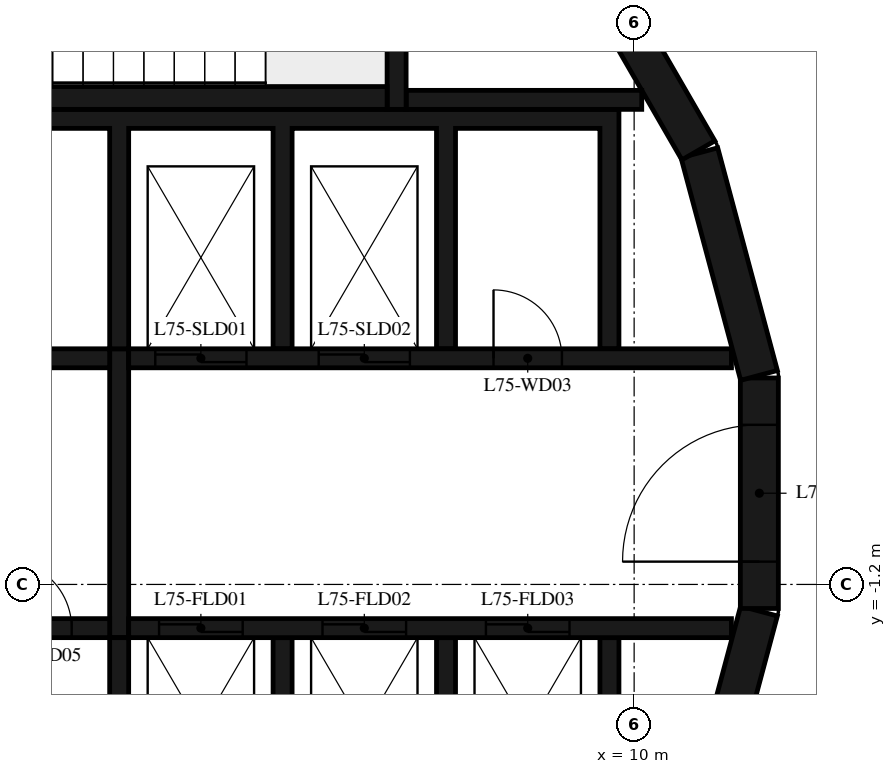
"""IFC4 building model, lengths in metres.
Left out: names, types, materials, properties, quantities, classifications, styles, units other than length and angle.
Written with IfcOpenShell. Run it as: python <this file> out.ifc"""

import sys

from ifc_helpers import new_model, si_unit, direction, frame, frame_2d, origin, place, context, subcontext, project, spatial, polyline, rectangle, outline, extrude, element, fill, save


model = new_model("IFC4")
c1 = context("Model", 3, precision=1e-05, world=origin(), true_north=direction((0.0, 1.0)))
c2 = subcontext(c1, "Body", "Model", "MODEL_VIEW")
j1 = project(units=[si_unit("LENGTHUNIT", "METRE"), si_unit("PLANEANGLEUNIT", "RADIAN")], contexts=[c1])
p1 = place(None, origin())
s1 = spatial("IfcSite", under=j1, at=p1, CompositionType="ELEMENT")
p2 = place(p1, origin())
s2 = spatial("IfcBuilding", under=s1, at=p2, CompositionType="ELEMENT")
p3 = place(p2, frame((0.0, 0.0, 291.4)))
s3 = spatial("IfcBuildingStorey", under=s2, at=p3, CompositionType="ELEMENT", Elevation=291.4)
p4 = place(p3, frame((10.858, -4.479, 0.0), z_axis=(0.0, 0.0, 1.0), x_axis=(0.258734743916, 0.965948410781, 0.0)))
e1 = element("IfcWall", 1, at=p4, inside=s3, PredefinedType="SHEAR", context=c2, shape_type="SweptSolid", body=[
    extrude(rectangle(XDim=3.033, YDim=0.5, at=frame_2d((1.516, 0.0))), origin(), (0.0, 0.0, 1.0), 6.35),
])
p5 = place(p3, frame((11.647, -1.516, 0.0), z_axis=(0.0, 0.0, 1.0), x_axis=(0.0, 1.0, 0.0)))
e2 = element("IfcWall", 2, at=p5, inside=s3, PredefinedType="SHEAR", context=c2, shape_type="SweptSolid", body=[
    extrude(rectangle(XDim=3.033, YDim=0.5, at=frame_2d((1.516, 0.0))), origin(), (0.0, 0.0, 1.0), 6.35),
])
p6 = place(p5, frame((0.616, 0.0, 0.0)))
e3 = element("IfcOpeningElement", 3, at=p6, cuts=e2, PredefinedType="OPENING", context=c2, shape_type="SweptSolid", body=[
    extrude(rectangle(XDim=1.8, YDim=2.1, at=frame_2d((0.9, 1.05))), frame((0.0, 0.26, 0.0), z_axis=(0.0, -1.0, 0.0), x_axis=(1.0, 0.0, 0.0)), (0.0, 0.0, 1.0), 0.52),
])
for number, where, z_axis, x_axis in (
    (4, (11.643, 1.55, 0.0), (0.0, 0.0, 1.0), (-0.259, 0.966, 0.0)),
    (5, (10.845, 4.51, 0.0), (0.0, 0.0, 1.0), (-0.5, 0.866, 0.0)),
):
    element("IfcWall", number, at=place(p3, frame(where, z_axis=z_axis, x_axis=x_axis)), inside=s3, PredefinedType="SHEAR", context=c2, shape_type="SweptSolid", body=[
        extrude(rectangle(XDim=3.033, YDim=0.5, at=frame_2d((1.516, 0.0))), origin(), (0.0, 0.0, 1.0), 6.35),
    ])
p7 = place(p3, frame((0.0, 5.2, 0.0), z_axis=(0.0, 0.0, 1.0), x_axis=(1.0, 0.0, 0.0)))
e6 = element("IfcWall", 6, at=p7, inside=s3, PredefinedType="SHEAR", context=c2, shape_type="SweptSolid", body=[
    extrude(rectangle(XDim=6.75, YDim=0.3, at=frame_2d((3.375, 0.0))), origin(), (0.0, 0.0, 1.0), 6.35),
])
p8 = place(p3, frame((6.875, 5.05, 0.0), z_axis=(0.0, 0.0, 1.0), x_axis=(0.0, 1.0, 0.0)))
e7 = element("IfcWall", 7, at=p8, inside=s3, PredefinedType="SHEAR", context=c2, shape_type="SweptSolid", body=[
    extrude(rectangle(XDim=3.92, YDim=0.25, at=frame_2d((1.96, 0.0))), origin(), (0.0, 0.0, 1.0), 6.35),
])
p9 = place(p8, frame((1.11, 0.0, 0.0)))
e8 = element("IfcOpeningElement", 8, at=p9, cuts=e7, PredefinedType="OPENING", context=c2, shape_type="SweptSolid", body=[
    extrude(rectangle(XDim=1.2, YDim=2.1, at=frame_2d((0.6, 1.05))), frame((0.0, 0.135, 0.0), z_axis=(0.0, -1.0, 0.0), x_axis=(1.0, 0.0, 0.0)), (0.0, 0.0, 1.0), 0.27),
])
p10 = place(p3, frame((7.0, 5.175, 0.0), z_axis=(0.0, 0.0, 1.0), x_axis=(1.0, 0.0, 0.0)))
e9 = element("IfcWall", 9, at=p10, inside=s3, PredefinedType="SHEAR", context=c2, shape_type="SweptSolid", body=[
    extrude(rectangle(XDim=3.1, YDim=0.25, at=frame_2d((1.55, 0.0))), origin(), (0.0, 0.0, 1.0), 6.35),
])
p11 = place(p3, origin())
e10 = element("IfcWall", 10, at=p11, inside=s3, PredefinedType="SHEAR", context=c2, shape_type="SweptSolid", body=[
    extrude(outline(polyline([(-9.8, 1.9), (-9.55, 1.9), (-9.55, 4.8), (-3.35, 4.8), (-3.35, 1.9), (-3.1, 1.9), (-3.1, 4.8), (3.1, 4.8), (3.1, 1.9), (3.35, 1.9), (3.35, 4.8), (5.25, 4.8), (5.25, 1.9), (5.5, 1.9), (5.5, 4.8), (7.4, 4.8), (7.4, 1.9), (7.65, 1.9), (7.65, 4.8), (9.55, 4.8), (9.55, 1.9), (9.8, 1.9), (9.8, 4.8), (9.8, 5.05), (-9.8, 5.05), (-9.8, 4.8), (-9.8, 1.9)])), origin(), (0.0, 0.0, 1.0), 6.35),
])
p12 = place(p3, origin())
e11 = element("IfcWall", 11, at=p12, inside=s3, PredefinedType="SHEAR", context=c2, shape_type="SweptSolid", body=[
    extrude(outline(polyline([(9.8, -5.05), (9.8, -4.8), (9.8, -1.9), (9.55, -1.9), (9.55, -4.8), (7.65, -4.8), (7.65, -1.9), (7.4, -1.9), (7.4, -4.8), (5.5, -4.8), (5.5, -1.9), (5.25, -1.9), (5.25, -4.8), (3.35, -4.8), (3.35, -1.9), (3.1, -1.9), (3.1, -4.8), (1.2, -4.8), (1.2, -1.9), (0.95, -1.9), (0.95, -4.8), (-0.95, -4.8), (-0.95, -1.9), (-1.2, -1.9), (-1.2, -4.8), (-3.1, -4.8), (-3.1, -1.9), (-3.35, -1.9), (-3.35, -4.8), (-5.25, -4.8), (-5.25, -1.9), (-5.5, -1.9), (-5.5, -4.8), (-9.55, -4.8), (-9.55, -1.9), (-9.8, -1.9), (-9.8, -4.8), (-9.8, -5.05), (9.8, -5.05)])), origin(), (0.0, 0.0, 1.0), 6.35),
])
p13 = place(p3, frame((-11.28, 1.775, 0.0), z_axis=(0.0, 0.0, 1.0), x_axis=(1.0, 0.0, 0.0)))
e12 = element("IfcWall", 12, at=p13, inside=s3, PredefinedType="SHEAR", context=c2, shape_type="SweptSolid", body=[
    extrude(rectangle(XDim=14.38, YDim=0.25, at=frame_2d((7.19, 0.0))), origin(), (0.0, 0.0, 1.0), 6.35),
])
p14 = place(p13, frame((4.38, 0.0, 0.0)))
e13 = element("IfcOpeningElement", 13, at=p14, cuts=e12, PredefinedType="OPENING", context=c2, shape_type="SweptSolid", body=[
    extrude(rectangle(XDim=0.9, YDim=2.1, at=frame_2d((0.45, 1.05))), frame((0.0, 0.135, 0.0), z_axis=(0.0, -1.0, 0.0), x_axis=(1.0, 0.0, 0.0)), (0.0, 0.0, 1.0), 0.27),
])
p15 = place(p13, frame((10.83, 0.0, 0.0)))
e14 = element("IfcOpeningElement", 14, at=p15, cuts=e12, PredefinedType="OPENING", context=c2, shape_type="SweptSolid", body=[
    extrude(rectangle(XDim=0.9, YDim=2.1, at=frame_2d((0.45, 1.05))), frame((0.0, 0.135, 0.0), z_axis=(0.0, -1.0, 0.0), x_axis=(1.0, 0.0, 0.0)), (0.0, 0.0, 1.0), 0.27),
])
p16 = place(p3, frame((3.35, 1.775, 0.0), z_axis=(0.0, 0.0, 1.0), x_axis=(1.0, 0.0, 0.0)))
e15 = element("IfcWall", 15, at=p16, inside=s3, PredefinedType="SHEAR", context=c2, shape_type="SweptSolid", body=[
    extrude(rectangle(XDim=7.93, YDim=0.25, at=frame_2d((3.965, 0.0))), origin(), (0.0, 0.0, 1.0), 6.35),
])
p17 = place(p16, frame((0.35, 0.0, 0.0)))
e16 = element("IfcOpeningElement", 16, at=p17, cuts=e15, PredefinedType="OPENING", context=c2, shape_type="SweptSolid", body=[
    extrude(rectangle(XDim=1.2, YDim=2.4, at=frame_2d((0.6, 1.2))), frame((0.0, 0.135, 0.0), z_axis=(0.0, -1.0, 0.0), x_axis=(1.0, 0.0, 0.0)), (0.0, 0.0, 1.0), 0.27),
])
p18 = place(p16, frame((2.5, 0.0, 0.0)))
e17 = element("IfcOpeningElement", 17, at=p18, cuts=e15, PredefinedType="OPENING", context=c2, shape_type="SweptSolid", body=[
    extrude(rectangle(XDim=1.2, YDim=2.4, at=frame_2d((0.6, 1.2))), frame((0.0, 0.135, 0.0), z_axis=(0.0, -1.0, 0.0), x_axis=(1.0, 0.0, 0.0)), (0.0, 0.0, 1.0), 0.27),
])
p19 = place(p16, frame((4.8, 0.0, 0.0)))
e18 = element("IfcOpeningElement", 18, at=p19, cuts=e15, PredefinedType="OPENING", context=c2, shape_type="SweptSolid", body=[
    extrude(rectangle(XDim=0.9, YDim=2.1, at=frame_2d((0.45, 1.05))), frame((0.0, 0.135, 0.0), z_axis=(0.0, -1.0, 0.0), x_axis=(1.0, 0.0, 0.0)), (0.0, 0.0, 1.0), 0.27),
])
p20 = place(p3, frame((-11.28, -1.775, 0.0), z_axis=(0.0, 0.0, 1.0), x_axis=(1.0, 0.0, 0.0)))
e19 = element("IfcWall", 19, at=p20, inside=s3, PredefinedType="SHEAR", context=c2, shape_type="SweptSolid", body=[
    extrude(rectangle(XDim=14.38, YDim=0.25, at=frame_2d((7.19, 0.0))), origin(), (0.0, 0.0, 1.0), 6.35),
])
p21 = place(p20, frame((6.43, 0.0, 0.0)))
e20 = element("IfcOpeningElement", 20, at=p21, cuts=e19, PredefinedType="OPENING", context=c2, shape_type="SweptSolid", body=[
    extrude(rectangle(XDim=1.1, YDim=2.1, at=frame_2d((0.55, 1.05))), frame((0.0, 0.135, 0.0), z_axis=(0.0, -1.0, 0.0), x_axis=(1.0, 0.0, 0.0)), (0.0, 0.0, 1.0), 0.27),
])
p22 = place(p20, frame((8.58, 0.0, 0.0)))
e21 = element("IfcOpeningElement", 21, at=p22, cuts=e19, PredefinedType="OPENING", context=c2, shape_type="SweptSolid", body=[
    extrude(rectangle(XDim=1.1, YDim=2.1, at=frame_2d((0.55, 1.05))), frame((0.0, 0.135, 0.0), z_axis=(0.0, -1.0, 0.0), x_axis=(1.0, 0.0, 0.0)), (0.0, 0.0, 1.0), 0.27),
])
p23 = place(p20, frame((10.73, 0.0, 0.0)))
e22 = element("IfcOpeningElement", 22, at=p23, cuts=e19, PredefinedType="OPENING", context=c2, shape_type="SweptSolid", body=[
    extrude(rectangle(XDim=1.1, YDim=2.1, at=frame_2d((0.55, 1.05))), frame((0.0, 0.135, 0.0), z_axis=(0.0, -1.0, 0.0), x_axis=(1.0, 0.0, 0.0)), (0.0, 0.0, 1.0), 0.27),
])
p24 = place(p20, frame((3.305, 0.0, 0.0)))
e23 = element("IfcOpeningElement", 23, at=p24, cuts=e19, PredefinedType="OPENING", context=c2, shape_type="SweptSolid", body=[
    extrude(rectangle(XDim=0.9, YDim=2.1, at=frame_2d((0.45, 1.05))), frame((0.0, 0.135, 0.0), z_axis=(0.0, -1.0, 0.0), x_axis=(1.0, 0.0, 0.0)), (0.0, 0.0, 1.0), 0.27),
])
p25 = place(p20, frame((12.98, 0.0, 0.0)))
e24 = element("IfcOpeningElement", 24, at=p25, cuts=e19, PredefinedType="OPENING", context=c2, shape_type="SweptSolid", body=[
    extrude(rectangle(XDim=0.9, YDim=2.1, at=frame_2d((0.45, 1.05))), frame((0.0, 0.135, 0.0), z_axis=(0.0, -1.0, 0.0), x_axis=(1.0, 0.0, 0.0)), (0.0, 0.0, 1.0), 0.27),
])
p26 = place(p3, frame((3.35, -1.775, 0.0), z_axis=(0.0, 0.0, 1.0), x_axis=(1.0, 0.0, 0.0)))
e25 = element("IfcWall", 25, at=p26, inside=s3, PredefinedType="SHEAR", context=c2, shape_type="SweptSolid", body=[
    extrude(rectangle(XDim=7.93, YDim=0.25, at=frame_2d((3.965, 0.0))), origin(), (0.0, 0.0, 1.0), 6.35),
])
p27 = place(p26, frame((0.4, 0.0, 0.0)))
e26 = element("IfcOpeningElement", 26, at=p27, cuts=e25, PredefinedType="OPENING", context=c2, shape_type="SweptSolid", body=[
    extrude(rectangle(XDim=1.1, YDim=2.4, at=frame_2d((0.55, 1.2))), frame((0.0, 0.135, 0.0), z_axis=(0.0, -1.0, 0.0), x_axis=(1.0, 0.0, 0.0)), (0.0, 0.0, 1.0), 0.27),
])
p28 = place(p26, frame((2.55, 0.0, 0.0)))
e27 = element("IfcOpeningElement", 27, at=p28, cuts=e25, PredefinedType="OPENING", context=c2, shape_type="SweptSolid", body=[
    extrude(rectangle(XDim=1.1, YDim=2.4, at=frame_2d((0.55, 1.2))), frame((0.0, 0.135, 0.0), z_axis=(0.0, -1.0, 0.0), x_axis=(1.0, 0.0, 0.0)), (0.0, 0.0, 1.0), 0.27),
])
p29 = place(p26, frame((4.7, 0.0, 0.0)))
e28 = element("IfcOpeningElement", 28, at=p29, cuts=e25, PredefinedType="OPENING", context=c2, shape_type="SweptSolid", body=[
    extrude(rectangle(XDim=1.1, YDim=2.4, at=frame_2d((0.55, 1.2))), frame((0.0, 0.135, 0.0), z_axis=(0.0, -1.0, 0.0), x_axis=(1.0, 0.0, 0.0)), (0.0, 0.0, 1.0), 0.27),
])
p30 = place(p3, frame((3.225, -1.9, 0.0), z_axis=(0.0, 0.0, 1.0), x_axis=(0.0, 1.0, 0.0)))
e29 = element("IfcWall", 29, at=p30, inside=s3, PredefinedType="SHEAR", context=c2, shape_type="SweptSolid", body=[
    extrude(rectangle(XDim=3.8, YDim=0.25, at=frame_2d((1.9, 0.0))), origin(), (0.0, 0.0, 1.0), 6.35),
])
p31 = place(p3, frame((14.07, 5.83, 0.0), z_axis=(0.0, 0.0, 1.0), x_axis=(-0.500760497952, 0.865585884642, 0.0)))
e30 = element("IfcWall", 30, at=p31, inside=s3, PredefinedType="PARTITIONING", context=c2, shape_type="SweptSolid", body=[
    extrude(rectangle(XDim=3.874, YDim=0.2, at=frame_2d((1.937, 0.0))), origin(), (0.0, 0.0, 1.0), 6.35),
])
p32 = place(p31, frame((1.437, 0.0, 0.0)))
e31 = element("IfcOpeningElement", 31, at=p32, cuts=e30, PredefinedType="OPENING", context=c2, shape_type="SweptSolid", body=[
    extrude(rectangle(XDim=1.0, YDim=2.1, at=frame_2d((0.5, 1.05))), frame((0.0, 0.11, 0.0), z_axis=(0.0, -1.0, 0.0), x_axis=(1.0, 0.0, 0.0)), (0.0, 0.0, 1.0), 0.22),
])
p33 = place(p6, origin())
e32 = element("IfcDoor", 32, at=p33, inside=s3, OperationType="DOUBLE_DOOR_SINGLE_SWING", PredefinedType="DOOR", context=c2, shape_type="SweptSolid", body=[
    extrude(rectangle(XDim=1.8, YDim=2.1, at=frame_2d((0.9, 1.05))), frame((0.0, 0.025, 0.0), z_axis=(0.0, -1.0, 0.0), x_axis=(1.0, 0.0, 0.0)), (0.0, 0.0, 1.0), 0.05),
])
fill(e3, e32)
p34 = place(p17, origin())
e33 = element("IfcDoor", 33, at=p34, inside=s3, OperationType="DOUBLE_DOOR_SLIDING", PredefinedType="DOOR", context=c2, shape_type="SweptSolid", body=[
    extrude(rectangle(XDim=1.2, YDim=2.4, at=frame_2d((0.6, 1.2))), frame((0.0, 0.025, 0.0), z_axis=(0.0, -1.0, 0.0), x_axis=(1.0, 0.0, 0.0)), (0.0, 0.0, 1.0), 0.05),
])
fill(e16, e33)
p35 = place(p18, origin())
e34 = element("IfcDoor", 34, at=p35, inside=s3, OperationType="DOUBLE_DOOR_SLIDING", PredefinedType="DOOR", context=c2, shape_type="SweptSolid", body=[
    extrude(rectangle(XDim=1.2, YDim=2.4, at=frame_2d((0.6, 1.2))), frame((0.0, 0.025, 0.0), z_axis=(0.0, -1.0, 0.0), x_axis=(1.0, 0.0, 0.0)), (0.0, 0.0, 1.0), 0.05),
])
fill(e17, e34)
p36 = place(p27, origin())
e35 = element("IfcDoor", 35, at=p36, inside=s3, OperationType="DOUBLE_DOOR_SLIDING", PredefinedType="DOOR", context=c2, shape_type="SweptSolid", body=[
    extrude(rectangle(XDim=1.1, YDim=2.4, at=frame_2d((0.55, 1.2))), frame((0.0, 0.025, 0.0), z_axis=(0.0, -1.0, 0.0), x_axis=(1.0, 0.0, 0.0)), (0.0, 0.0, 1.0), 0.05),
])
fill(e26, e35)
p37 = place(p28, origin())
e36 = element("IfcDoor", 36, at=p37, inside=s3, OperationType="DOUBLE_DOOR_SLIDING", PredefinedType="DOOR", context=c2, shape_type="SweptSolid", body=[
    extrude(rectangle(XDim=1.1, YDim=2.4, at=frame_2d((0.55, 1.2))), frame((0.0, 0.025, 0.0), z_axis=(0.0, -1.0, 0.0), x_axis=(1.0, 0.0, 0.0)), (0.0, 0.0, 1.0), 0.05),
])
fill(e27, e36)
p38 = place(p29, origin())
e37 = element("IfcDoor", 37, at=p38, inside=s3, OperationType="DOUBLE_DOOR_SLIDING", PredefinedType="DOOR", context=c2, shape_type="SweptSolid", body=[
    extrude(rectangle(XDim=1.1, YDim=2.4, at=frame_2d((0.55, 1.2))), frame((0.0, 0.025, 0.0), z_axis=(0.0, -1.0, 0.0), x_axis=(1.0, 0.0, 0.0)), (0.0, 0.0, 1.0), 0.05),
])
fill(e28, e37)
p39 = place(p19, origin())
e38 = element("IfcDoor", 38, at=p39, inside=s3, OperationType="SINGLE_SWING_LEFT", PredefinedType="DOOR", context=c2, shape_type="SweptSolid", body=[
    extrude(rectangle(XDim=0.9, YDim=2.1, at=frame_2d((0.45, 1.05))), frame((0.0, 0.025, 0.0), z_axis=(0.0, -1.0, 0.0), x_axis=(1.0, 0.0, 0.0)), (0.0, 0.0, 1.0), 0.05),
])
fill(e18, e38)
p40 = place(p25, origin())
e39 = element("IfcDoor", 39, at=p40, inside=s3, OperationType="SINGLE_SWING_LEFT", PredefinedType="DOOR", context=c2, shape_type="SweptSolid", body=[
    extrude(rectangle(XDim=0.9, YDim=2.1, at=frame_2d((0.45, 1.05))), frame((0.0, 0.025, 0.0), z_axis=(0.0, -1.0, 0.0), x_axis=(1.0, 0.0, 0.0)), (0.0, 0.0, 1.0), 0.05),
])
fill(e24, e39)
save(model, sys.argv[1])
